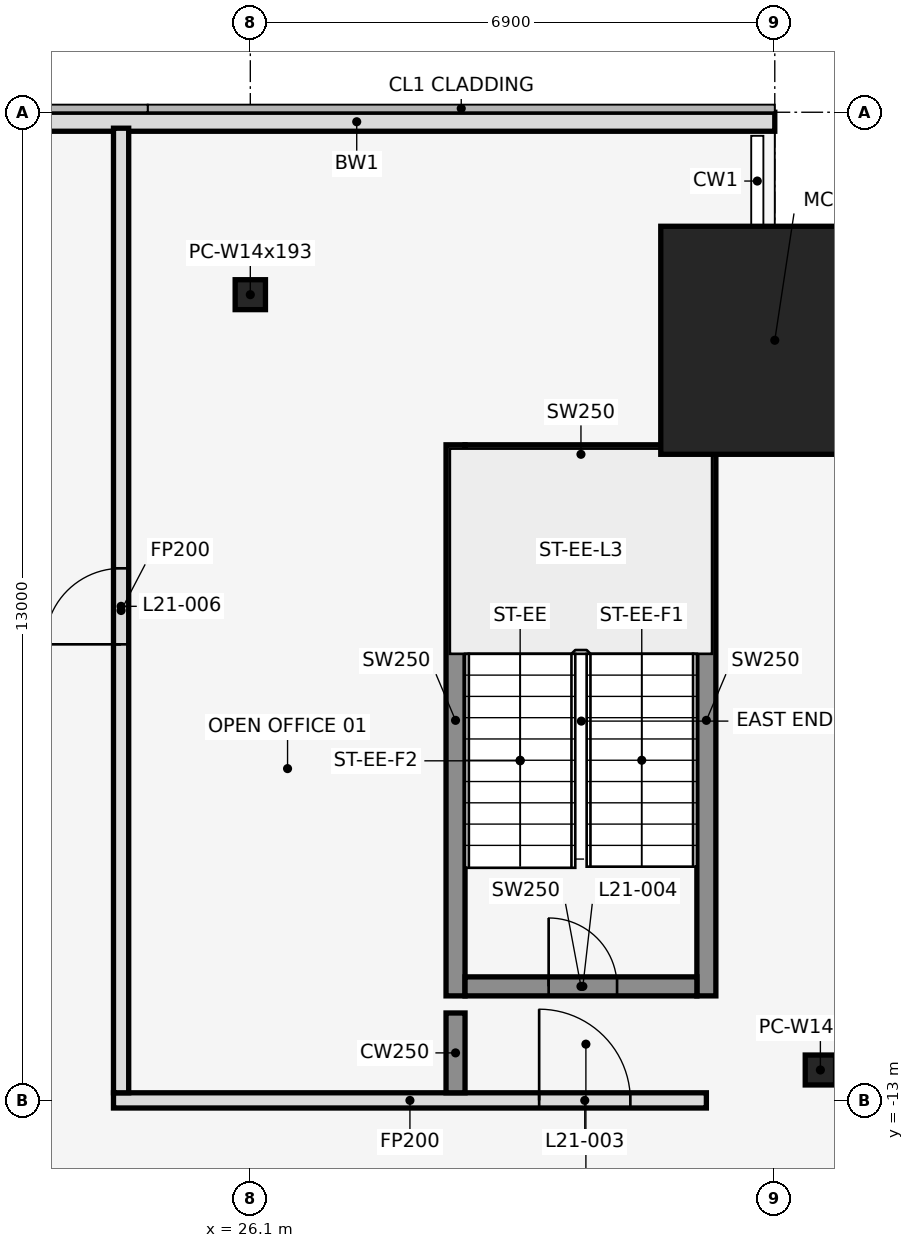
"""IFC4 building model, lengths in metres.
Left out: names, types, materials, properties, quantities, classifications, styles, units other than length and angle.
Written with IfcOpenShell. Run it as: python <this file> out.ifc"""

import sys

from ifc_helpers import new_model, si_unit, direction, frame, frame_2d, origin, origin_2d, place, context, subcontext, project, spatial, rectangle, hollow_rectangle, i_section, extrude, element, fill, save


model = new_model("IFC4")
c1 = context("Model", 3, precision=1e-05, world=origin(), true_north=direction((0.0, 1.0)))
c2 = subcontext(c1, "Body", "Model", "MODEL_VIEW")
j1 = project(units=[si_unit("LENGTHUNIT", "METRE"), si_unit("PLANEANGLEUNIT", "RADIAN")], contexts=[c1])
p1 = place(None, origin())
s1 = spatial("IfcSite", under=j1, at=p1, CompositionType="ELEMENT")
p2 = place(p1, origin())
s2 = spatial("IfcBuilding", under=s1, at=p2, CompositionType="ELEMENT")
p3 = place(p2, frame((0.0, 0.0, 102.2)))
s3 = spatial("IfcBuildingStorey", under=s2, at=p3, CompositionType="ELEMENT", Elevation=102.2)
p4 = place(p3, frame((26.1, -2.4, 0.0), z_axis=(0.0, 0.0, 1.0), x_axis=(1.0, 0.0, 0.0)))
e1 = element("IfcColumn", 1, at=p4, inside=s3, PredefinedType="COLUMN", context=c2, shape_type="SweptSolid", body=[
    extrude(i_section(OverallWidth=0.399, OverallDepth=0.394, WebThickness=0.023, FlangeThickness=0.037, at=origin_2d()), origin(), (0.0, 0.0, 1.0), 4.1),
])
p5 = place(p3, frame((33.0, -3.0, 0.0), z_axis=(0.0, 0.0, 1.0), x_axis=(1.0, 0.0, 0.0)))
e2 = element("IfcColumn", 2, at=p5, inside=s3, PredefinedType="COLUMN", context=c2, shape_type="SweptSolid", body=[
    extrude(hollow_rectangle(XDim=3.0, YDim=3.0, WallThickness=0.09, at=origin_2d()), origin(), (0.0, 0.0, 1.0), 4.1),
])
p6 = place(p3, frame((33.6, -12.6, 0.0), z_axis=(0.0, 0.0, 1.0), x_axis=(1.0, 0.0, 0.0)))
e3 = element("IfcColumn", 3, at=p6, inside=s3, PredefinedType="COLUMN", context=c2, shape_type="SweptSolid", body=[
    extrude(i_section(OverallWidth=0.399, OverallDepth=0.394, WebThickness=0.023, FlangeThickness=0.037, at=origin_2d()), origin(), (0.0, 0.0, 1.0), 4.1),
])
p7 = place(p3, frame((33.0, -0.125, 0.0), z_axis=(0.0, 0.0, 1.0), x_axis=(-1.0, 0.0, 0.0)))
e4 = element("IfcWall", 4, at=p7, inside=s3, PredefinedType="STANDARD", context=c2, shape_type="SweptSolid", body=[
    extrude(rectangle(XDim=11.0, YDim=0.25, at=frame_2d((5.5, 0.0))), origin(), (0.0, 0.0, 1.0), 3.95),
])
for number, where, z_axis, x_axis in (
    (5, (28.8, -11.625, 0.0), (0.0, 0.0, 1.0), (0.0, 1.0, 0.0)),
    (6, (32.1, -11.625, 0.0), (0.0, 0.0, 1.0), (0.0, 1.0, 0.0)),
):
    element("IfcWall", number, at=place(p3, frame(where, z_axis=z_axis, x_axis=x_axis)), inside=s3, PredefinedType="SHEAR", context=c2, shape_type="SweptSolid", body=[
        extrude(rectangle(XDim=7.25, YDim=0.25, at=frame_2d((3.625, 0.0))), origin(), (0.0, 0.0, 1.0), 4.1),
    ])
p8 = place(p3, frame((28.925, -11.5, 0.0), z_axis=(0.0, 0.0, 1.0), x_axis=(1.0, 0.0, 0.0)))
e7 = element("IfcWall", 7, at=p8, inside=s3, PredefinedType="SHEAR", context=c2, shape_type="SweptSolid", body=[
    extrude(rectangle(XDim=3.05, YDim=0.25, at=frame_2d((1.525, 0.0))), origin(), (0.0, 0.0, 1.0), 4.1),
])
p9 = place(p8, frame((1.1, 0.0, 0.0)))
e8 = element("IfcOpeningElement", 8, at=p9, cuts=e7, PredefinedType="OPENING", context=c2, shape_type="SweptSolid", body=[
    extrude(rectangle(XDim=0.9, YDim=2.1, at=frame_2d((0.45, 1.05))), frame((0.0, 0.137, 0.0), z_axis=(0.0, -1.0, 0.0), x_axis=(1.0, 0.0, 0.0)), (0.0, 0.0, 1.0), 0.274),
])
p10 = place(p3, frame((28.925, -4.5, 0.0), z_axis=(0.0, 0.0, 1.0), x_axis=(1.0, 0.0, 0.0)))
e9 = element("IfcWall", 9, at=p10, inside=s3, PredefinedType="SHEAR", context=c2, shape_type="SweptSolid", body=[
    extrude(rectangle(XDim=3.05, YDim=0.25, at=frame_2d((1.525, 0.0))), origin(), (0.0, 0.0, 1.0), 4.1),
])
p11 = place(p3, frame((24.3, -13.0, 0.0), z_axis=(0.0, 0.0, 1.0), x_axis=(1.0, 0.0, 0.0)))
e10 = element("IfcWall", 10, at=p11, inside=s3, PredefinedType="PARTITIONING", context=c2, shape_type="SweptSolid", body=[
    extrude(rectangle(XDim=7.8, YDim=0.2, at=frame_2d((3.9, 0.0))), origin(), (0.0, 0.0, 1.0), 3.018),
])
p12 = place(p11, frame((5.6, 0.0, 0.0)))
e11 = element("IfcOpeningElement", 11, at=p12, cuts=e10, PredefinedType="OPENING", context=c2, shape_type="SweptSolid", body=[
    extrude(rectangle(XDim=1.2, YDim=2.1, at=frame_2d((0.6, 1.05))), frame((0.0, 0.112, 0.0), z_axis=(0.0, -1.0, 0.0), x_axis=(1.0, 0.0, 0.0)), (0.0, 0.0, 1.0), 0.224),
])
p13 = place(p3, frame((24.4, -12.9, 0.0), z_axis=(0.0, 0.0, 1.0), x_axis=(0.0, 1.0, 0.0)))
e12 = element("IfcWall", 12, at=p13, inside=s3, PredefinedType="PARTITIONING", context=c2, shape_type="SweptSolid", body=[
    extrude(rectangle(XDim=12.69, YDim=0.2, at=frame_2d((6.345, 0.0))), origin(), (0.0, 0.0, 1.0), 3.018),
])
p14 = place(p13, frame((5.9, 0.0, 0.0)))
e13 = element("IfcOpeningElement", 13, at=p14, cuts=e12, PredefinedType="OPENING", context=c2, shape_type="SweptSolid", body=[
    extrude(rectangle(XDim=1.0, YDim=2.1, at=frame_2d((0.5, 1.05))), frame((0.0, 0.112, 0.0), z_axis=(0.0, -1.0, 0.0), x_axis=(1.0, 0.0, 0.0)), (0.0, 0.0, 1.0), 0.224),
])
p15 = place(p3, frame((28.8, -12.9, 0.0), z_axis=(0.0, 0.0, 1.0), x_axis=(0.0, 1.0, 0.0)))
e14 = element("IfcWall", 14, at=p15, inside=s3, PredefinedType="SHEAR", context=c2, shape_type="SweptSolid", body=[
    extrude(rectangle(XDim=1.05, YDim=0.25, at=frame_2d((0.525, 0.0))), origin(), (0.0, 0.0, 1.0), 4.1),
])
p16 = place(p12, origin())
e15 = element("IfcDoor", 15, at=p16, inside=s3, OperationType="SINGLE_SWING_RIGHT", PredefinedType="DOOR", context=c2, shape_type="SweptSolid", body=[
    extrude(rectangle(XDim=1.2, YDim=2.1, at=frame_2d((0.6, 1.05))), frame((0.0, 0.025, 0.0), z_axis=(0.0, -1.0, 0.0), x_axis=(1.0, 0.0, 0.0)), (0.0, 0.0, 1.0), 0.05),
])
fill(e11, e15)
p17 = place(p9, origin())
e16 = element("IfcDoor", 16, at=p17, inside=s3, OperationType="SINGLE_SWING_LEFT", PredefinedType="DOOR", context=c2, shape_type="SweptSolid", body=[
    extrude(rectangle(XDim=0.9, YDim=2.1, at=frame_2d((0.45, 1.05))), frame((0.0, 0.025, 0.0), z_axis=(0.0, -1.0, 0.0), x_axis=(1.0, 0.0, 0.0)), (0.0, 0.0, 1.0), 0.05),
])
fill(e8, e16)
p18 = place(p14, frame((1.0, 0.0, 0.0), z_axis=(0.0, 0.0, 1.0), x_axis=(-1.0, 0.0, 0.0)))
e17 = element("IfcDoor", 17, at=p18, inside=s3, OperationType="SINGLE_SWING_RIGHT", PredefinedType="DOOR", context=c2, shape_type="SweptSolid", body=[
    extrude(rectangle(XDim=1.0, YDim=2.1, at=frame_2d((0.5, 1.05))), frame((0.0, 0.025, 0.0), z_axis=(0.0, -1.0, 0.0), x_axis=(1.0, 0.0, 0.0)), (0.0, 0.0, 1.0), 0.05),
])
fill(e13, e17)
save(model, sys.argv[1])
